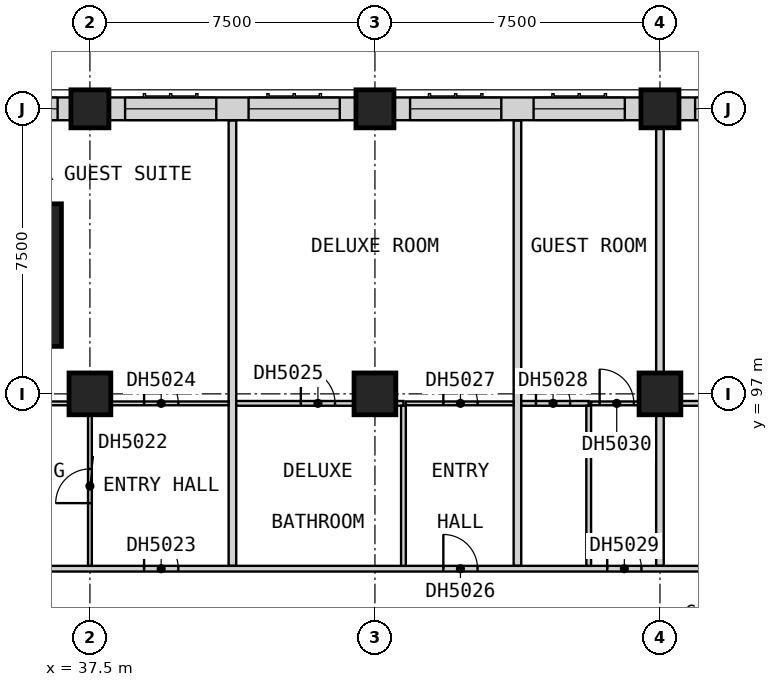
"""IFC4 building model, lengths in metres.
Left out: names, types, materials, properties, quantities, classifications, styles, units other than length and angle.
Written with IfcOpenShell. Run it as: python <this file> out.ifc"""

import sys

from ifc_helpers import new_model, si_unit, direction, frame, frame_2d, origin, origin_2d, place, context, subcontext, project, spatial, rectangle, extrude, element, fill, save


model = new_model("IFC4")
c1 = context("Model", 3, precision=1e-05, world=origin(), true_north=direction((0.0, 1.0)))
c2 = subcontext(c1, "Body", "Model", "MODEL_VIEW")
j1 = project(units=[si_unit("LENGTHUNIT", "METRE"), si_unit("PLANEANGLEUNIT", "RADIAN")], contexts=[c1])
p1 = place(None, origin())
s1 = spatial("IfcSite", under=j1, at=p1, CompositionType="ELEMENT")
p2 = place(p1, origin())
s2 = spatial("IfcBuilding", under=s1, at=p2, CompositionType="ELEMENT")
p3 = place(p2, frame((0.0, 0.0, 93.5)))
s3 = spatial("IfcBuildingStorey", under=s2, at=p3, CompositionType="ELEMENT", Elevation=93.5)
p4 = place(p3, frame((37.5, 97.0, 0.0), z_axis=(0.0, 0.0, 1.0), x_axis=(1.0, 0.0, 0.0)))
e1 = element("IfcColumn", 1, at=p4, inside=s3, PredefinedType="COLUMN", context=c2, shape_type="SweptSolid", body=[
    extrude(rectangle(XDim=1.1, YDim=1.1, at=origin_2d()), origin(), (0.0, 0.0, 1.0), 3.6),
])
p5 = place(p3, frame((37.5, 104.5, 0.0), z_axis=(0.0, 0.0, 1.0), x_axis=(1.0, 0.0, 0.0)))
e2 = element("IfcColumn", 2, at=p5, inside=s3, PredefinedType="COLUMN", context=c2, shape_type="SweptSolid", body=[
    extrude(rectangle(XDim=1.0, YDim=1.0, at=origin_2d()), origin(), (0.0, 0.0, 1.0), 3.6),
])
p6 = place(p3, frame((45.0, 97.0, 0.0), z_axis=(0.0, 0.0, 1.0), x_axis=(1.0, 0.0, 0.0)))
e3 = element("IfcColumn", 3, at=p6, inside=s3, PredefinedType="COLUMN", context=c2, shape_type="SweptSolid", body=[
    extrude(rectangle(XDim=1.1, YDim=1.1, at=origin_2d()), origin(), (0.0, 0.0, 1.0), 3.6),
])
p7 = place(p3, frame((45.0, 104.5, 0.0), z_axis=(0.0, 0.0, 1.0), x_axis=(1.0, 0.0, 0.0)))
e4 = element("IfcColumn", 4, at=p7, inside=s3, PredefinedType="COLUMN", context=c2, shape_type="SweptSolid", body=[
    extrude(rectangle(XDim=1.0, YDim=1.0, at=origin_2d()), origin(), (0.0, 0.0, 1.0), 3.6),
])
p8 = place(p3, frame((52.5, 97.0, 0.0), z_axis=(0.0, 0.0, 1.0), x_axis=(1.0, 0.0, 0.0)))
e5 = element("IfcColumn", 5, at=p8, inside=s3, PredefinedType="COLUMN", context=c2, shape_type="SweptSolid", body=[
    extrude(rectangle(XDim=1.1, YDim=1.1, at=origin_2d()), origin(), (0.0, 0.0, 1.0), 3.6),
])
p9 = place(p3, frame((52.5, 104.5, 0.0), z_axis=(0.0, 0.0, 1.0), x_axis=(1.0, 0.0, 0.0)))
e6 = element("IfcColumn", 6, at=p9, inside=s3, PredefinedType="COLUMN", context=c2, shape_type="SweptSolid", body=[
    extrude(rectangle(XDim=1.0, YDim=1.0, at=origin_2d()), origin(), (0.0, 0.0, 1.0), 3.6),
])
p10 = place(p3, frame((34.875, 100.125, 0.0), z_axis=(0.0, 0.0, 1.0), x_axis=(1.0, 0.0, 0.0)))
e7 = element("IfcColumn", 7, at=p10, inside=s3, PredefinedType="COLUMN", context=c2, shape_type="SweptSolid", body=[
    extrude(rectangle(XDim=3.75, YDim=3.75, at=origin_2d()), origin(), (0.0, 0.0, 1.0), 3.6),
])
p11 = place(p3, frame((59.5, 104.5, 0.0), z_axis=(0.0, 0.0, 1.0), x_axis=(-1.0, 0.0, 0.0)))
e8 = element("IfcWall", 8, at=p11, inside=s3, PredefinedType="SOLIDWALL", context=c2, shape_type="SweptSolid", body=[
    extrude(rectangle(XDim=6.5, YDim=0.6, at=frame_2d((3.25, 0.0))), origin(), (0.0, 0.0, 1.0), 2.85),
])
p12 = place(p11, frame((3.675, 0.0, 0.8)))
e9 = element("IfcOpeningElement", 9, at=p12, cuts=e8, PredefinedType="OPENING", context=c2, shape_type="SweptSolid", body=[
    extrude(rectangle(XDim=2.4, YDim=1.8, at=frame_2d((1.2, 0.9))), frame((0.0, 0.31, 0.0), z_axis=(0.0, -1.0, 0.0), x_axis=(1.0, 0.0, 0.0)), (0.0, 0.0, 1.0), 0.62),
])
p13 = place(p11, frame((0.425, 0.0, 0.8)))
e10 = element("IfcOpeningElement", 10, at=p13, cuts=e8, PredefinedType="OPENING", context=c2, shape_type="SweptSolid", body=[
    extrude(rectangle(XDim=2.4, YDim=1.8, at=frame_2d((1.2, 0.9))), frame((0.0, 0.31, 0.0), z_axis=(0.0, -1.0, 0.0), x_axis=(1.0, 0.0, 0.0)), (0.0, 0.0, 1.0), 0.62),
])
p14 = place(p3, frame((52.0, 104.5, 0.0), z_axis=(0.0, 0.0, 1.0), x_axis=(-1.0, 0.0, 0.0)))
e11 = element("IfcWall", 11, at=p14, inside=s3, PredefinedType="SOLIDWALL", context=c2, shape_type="SweptSolid", body=[
    extrude(rectangle(XDim=6.5, YDim=0.6, at=frame_2d((3.25, 0.0))), origin(), (0.0, 0.0, 1.0), 2.85),
])
p15 = place(p14, frame((3.675, 0.0, 0.8)))
e12 = element("IfcOpeningElement", 12, at=p15, cuts=e11, PredefinedType="OPENING", context=c2, shape_type="SweptSolid", body=[
    extrude(rectangle(XDim=2.4, YDim=1.8, at=frame_2d((1.2, 0.9))), frame((0.0, 0.31, 0.0), z_axis=(0.0, -1.0, 0.0), x_axis=(1.0, 0.0, 0.0)), (0.0, 0.0, 1.0), 0.62),
])
p16 = place(p14, frame((0.425, 0.0, 0.8)))
e13 = element("IfcOpeningElement", 13, at=p16, cuts=e11, PredefinedType="OPENING", context=c2, shape_type="SweptSolid", body=[
    extrude(rectangle(XDim=2.4, YDim=1.8, at=frame_2d((1.2, 0.9))), frame((0.0, 0.31, 0.0), z_axis=(0.0, -1.0, 0.0), x_axis=(1.0, 0.0, 0.0)), (0.0, 0.0, 1.0), 0.62),
])
p17 = place(p3, frame((44.5, 104.5, 0.0), z_axis=(0.0, 0.0, 1.0), x_axis=(-1.0, 0.0, 0.0)))
e14 = element("IfcWall", 14, at=p17, inside=s3, PredefinedType="SOLIDWALL", context=c2, shape_type="SweptSolid", body=[
    extrude(rectangle(XDim=6.5, YDim=0.6, at=frame_2d((3.25, 0.0))), origin(), (0.0, 0.0, 1.0), 2.85),
])
p18 = place(p17, frame((3.675, 0.0, 0.8)))
e15 = element("IfcOpeningElement", 15, at=p18, cuts=e14, PredefinedType="OPENING", context=c2, shape_type="SweptSolid", body=[
    extrude(rectangle(XDim=2.4, YDim=1.8, at=frame_2d((1.2, 0.9))), frame((0.0, 0.31, 0.0), z_axis=(0.0, -1.0, 0.0), x_axis=(1.0, 0.0, 0.0)), (0.0, 0.0, 1.0), 0.62),
])
p19 = place(p17, frame((0.425, 0.0, 0.8)))
e16 = element("IfcOpeningElement", 16, at=p19, cuts=e14, PredefinedType="OPENING", context=c2, shape_type="SweptSolid", body=[
    extrude(rectangle(XDim=2.4, YDim=1.8, at=frame_2d((1.2, 0.9))), frame((0.0, 0.31, 0.0), z_axis=(0.0, -1.0, 0.0), x_axis=(1.0, 0.0, 0.0)), (0.0, 0.0, 1.0), 0.62),
])
p20 = place(p3, frame((37.0, 104.5, 0.0), z_axis=(0.0, 0.0, 1.0), x_axis=(-1.0, 0.0, 0.0)))
e17 = element("IfcWall", 17, at=p20, inside=s3, PredefinedType="SOLIDWALL", context=c2, shape_type="SweptSolid", body=[
    extrude(rectangle(XDim=4.0, YDim=0.6, at=frame_2d((2.0, 0.0))), origin(), (0.0, 0.0, 1.0), 3.35),
])
p21 = place(p20, frame((0.35, 0.0, 0.8)))
e18 = element("IfcOpeningElement", 18, at=p21, cuts=e17, PredefinedType="OPENING", context=c2, shape_type="SweptSolid", body=[
    extrude(rectangle(XDim=2.4, YDim=1.8, at=frame_2d((1.2, 0.9))), frame((0.0, 0.31, 0.0), z_axis=(0.0, -1.0, 0.0), x_axis=(1.0, 0.0, 0.0)), (0.0, 0.0, 1.0), 0.62),
])
for number, where, z_axis, x_axis in (
    (19, (41.25, 92.475, 0.0), (0.0, 0.0, 1.0), (0.0, 1.0, 0.0)),
    (20, (48.75, 92.475, 0.0), (0.0, 0.0, 1.0), (0.0, 1.0, 0.0)),
):
    element("IfcWall", number, at=place(p3, frame(where, z_axis=z_axis, x_axis=x_axis)), inside=s3, PredefinedType="PARTITIONING", context=c2, shape_type="SweptSolid", body=[
        extrude(rectangle(XDim=11.715, YDim=0.2, at=frame_2d((5.857, 0.0))), origin(), (0.0, 0.0, 1.0), 3.35),
    ])
p22 = place(p3, frame((52.5, 92.475, 0.0), z_axis=(0.0, 0.0, 1.0), x_axis=(0.0, 1.0, 0.0)))
e21 = element("IfcWall", 21, at=p22, inside=s3, PredefinedType="PARTITIONING", context=c2, shape_type="SweptSolid", body=[
    extrude(rectangle(XDim=12.525, YDim=0.2, at=frame_2d((6.262, 0.0))), origin(), (0.0, 0.0, 1.0), 3.35),
])
p23 = place(p3, frame((33.75, 92.4, 0.0), z_axis=(0.0, 0.0, 1.0), x_axis=(1.0, 0.0, 0.0)))
e22 = element("IfcWall", 22, at=p23, inside=s3, PredefinedType="PARTITIONING", context=c2, shape_type="SweptSolid", body=[
    extrude(rectangle(XDim=43.65, YDim=0.15, at=frame_2d((21.825, 0.0))), origin(), (0.0, 0.0, 1.0), 3.35),
])
p24 = place(p23, frame((5.175, 0.0, 0.0)))
e23 = element("IfcOpeningElement", 23, at=p24, cuts=e22, PredefinedType="OPENING", context=c2, shape_type="SweptSolid", body=[
    extrude(rectangle(XDim=0.9, YDim=2.1, at=frame_2d((0.45, 1.05))), frame((0.0, 0.085, 0.0), z_axis=(0.0, -1.0, 0.0), x_axis=(1.0, 0.0, 0.0)), (0.0, 0.0, 1.0), 0.17),
])
p25 = place(p23, frame((13.05, 0.0, 0.0)))
e24 = element("IfcOpeningElement", 24, at=p25, cuts=e22, PredefinedType="OPENING", context=c2, shape_type="SweptSolid", body=[
    extrude(rectangle(XDim=0.9, YDim=2.1, at=frame_2d((0.45, 1.05))), frame((0.0, 0.085, 0.0), z_axis=(0.0, -1.0, 0.0), x_axis=(1.0, 0.0, 0.0)), (0.0, 0.0, 1.0), 0.17),
])
p26 = place(p23, frame((17.363, 0.0, 0.0)))
e25 = element("IfcOpeningElement", 25, at=p26, cuts=e22, PredefinedType="OPENING", context=c2, shape_type="SweptSolid", body=[
    extrude(rectangle(XDim=0.9, YDim=2.1, at=frame_2d((0.45, 1.05))), frame((0.0, 0.085, 0.0), z_axis=(0.0, -1.0, 0.0), x_axis=(1.0, 0.0, 0.0)), (0.0, 0.0, 1.0), 0.17),
])
p27 = place(p23, frame((24.3, 0.0, 0.0)))
e26 = element("IfcOpeningElement", 26, at=p27, cuts=e22, PredefinedType="OPENING", context=c2, shape_type="SweptSolid", body=[
    extrude(rectangle(XDim=0.9, YDim=2.1, at=frame_2d((0.45, 1.05))), frame((0.0, 0.085, 0.0), z_axis=(0.0, -1.0, 0.0), x_axis=(1.0, 0.0, 0.0)), (0.0, 0.0, 1.0), 0.17),
])
p28 = place(p23, frame((28.613, 0.0, 0.0)))
e27 = element("IfcOpeningElement", 27, at=p28, cuts=e22, PredefinedType="OPENING", context=c2, shape_type="SweptSolid", body=[
    extrude(rectangle(XDim=0.9, YDim=2.1, at=frame_2d((0.45, 1.05))), frame((0.0, 0.085, 0.0), z_axis=(0.0, -1.0, 0.0), x_axis=(1.0, 0.0, 0.0)), (0.0, 0.0, 1.0), 0.17),
])
p29 = place(p23, frame((32.363, 0.0, 0.0)))
e28 = element("IfcOpeningElement", 28, at=p29, cuts=e22, PredefinedType="OPENING", context=c2, shape_type="SweptSolid", body=[
    extrude(rectangle(XDim=0.9, YDim=2.1, at=frame_2d((0.45, 1.05))), frame((0.0, 0.085, 0.0), z_axis=(0.0, -1.0, 0.0), x_axis=(1.0, 0.0, 0.0)), (0.0, 0.0, 1.0), 0.17),
])
p30 = place(p23, frame((39.438, 0.0, 0.0)))
e29 = element("IfcOpeningElement", 29, at=p30, cuts=e22, PredefinedType="OPENING", context=c2, shape_type="SweptSolid", body=[
    extrude(rectangle(XDim=1.0, YDim=2.1, at=frame_2d((0.5, 1.05))), frame((0.0, 0.085, 0.0), z_axis=(0.0, -1.0, 0.0), x_axis=(1.0, 0.0, 0.0)), (0.0, 0.0, 1.0), 0.17),
])
p31 = place(p23, frame((42.0, 0.0, 0.0)))
e30 = element("IfcOpeningElement", 30, at=p31, cuts=e22, PredefinedType="OPENING", context=c2, shape_type="SweptSolid", body=[
    extrude(rectangle(XDim=0.9, YDim=2.1, at=frame_2d((0.45, 1.05))), frame((0.0, 0.085, 0.0), z_axis=(0.0, -1.0, 0.0), x_axis=(1.0, 0.0, 0.0)), (0.0, 0.0, 1.0), 0.17),
])
p32 = place(p3, frame((33.812, 96.75, 0.0), z_axis=(0.0, 0.0, 1.0), x_axis=(1.0, 0.0, 0.0)))
e31 = element("IfcWall", 31, at=p32, inside=s3, PredefinedType="PARTITIONING", context=c2, shape_type="SweptSolid", body=[
    extrude(rectangle(XDim=7.337, YDim=0.1, at=frame_2d((3.669, 0.0))), origin(), (0.0, 0.0, 1.0), 3.35),
])
p33 = place(p32, frame((5.113, 0.0, 0.0)))
e32 = element("IfcOpeningElement", 32, at=p33, cuts=e31, PredefinedType="OPENING", context=c2, shape_type="SweptSolid", body=[
    extrude(rectangle(XDim=0.9, YDim=2.1, at=frame_2d((0.45, 1.05))), frame((0.0, 0.06, 0.0), z_axis=(0.0, -1.0, 0.0), x_axis=(1.0, 0.0, 0.0)), (0.0, 0.0, 1.0), 0.12),
])
p34 = place(p3, frame((45.812, 96.75, 0.0), z_axis=(0.0, 0.0, 1.0), x_axis=(1.0, 0.0, 0.0)))
e33 = element("IfcWall", 33, at=p34, inside=s3, PredefinedType="PARTITIONING", context=c2, shape_type="SweptSolid", body=[
    extrude(rectangle(XDim=2.837, YDim=0.1, at=frame_2d((1.419, 0.0))), origin(), (0.0, 0.0, 1.0), 3.35),
])
p35 = place(p34, frame((0.988, 0.0, 0.0)))
e34 = element("IfcOpeningElement", 34, at=p35, cuts=e33, PredefinedType="OPENING", context=c2, shape_type="SweptSolid", body=[
    extrude(rectangle(XDim=0.9, YDim=2.1, at=frame_2d((0.45, 1.05))), frame((0.0, 0.06, 0.0), z_axis=(0.0, -1.0, 0.0), x_axis=(1.0, 0.0, 0.0)), (0.0, 0.0, 1.0), 0.12),
])
p36 = place(p3, frame((50.688, 96.75, 0.0), z_axis=(0.0, 0.0, 1.0), x_axis=(1.0, 0.0, 0.0)))
e35 = element("IfcWall", 35, at=p36, inside=s3, PredefinedType="PARTITIONING", context=c2, shape_type="SweptSolid", body=[
    extrude(rectangle(XDim=1.712, YDim=0.1, at=frame_2d((0.856, 0.0))), origin(), (0.0, 0.0, 1.0), 3.35),
])
p37 = place(p36, frame((0.225, 0.0, 0.0)))
e36 = element("IfcOpeningElement", 36, at=p37, cuts=e35, PredefinedType="OPENING", context=c2, shape_type="SweptSolid", body=[
    extrude(rectangle(XDim=0.9, YDim=2.1, at=frame_2d((0.45, 1.05))), frame((0.0, 0.06, 0.0), z_axis=(0.0, -1.0, 0.0), x_axis=(1.0, 0.0, 0.0)), (0.0, 0.0, 1.0), 0.12),
])
p38 = place(p3, frame((37.5, 92.475, 0.0), z_axis=(0.0, 0.0, 1.0), x_axis=(0.0, 1.0, 0.0)))
e37 = element("IfcWall", 37, at=p38, inside=s3, PredefinedType="PARTITIONING", context=c2, shape_type="SweptSolid", body=[
    extrude(rectangle(XDim=4.225, YDim=0.1, at=frame_2d((2.112, 0.0))), origin(), (0.0, 0.0, 1.0), 3.35),
])
p39 = place(p38, frame((1.65, 0.0, 0.0)))
e38 = element("IfcOpeningElement", 38, at=p39, cuts=e37, PredefinedType="OPENING", context=c2, shape_type="SweptSolid", body=[
    extrude(rectangle(XDim=0.9, YDim=2.1, at=frame_2d((0.45, 1.05))), frame((0.0, 0.06, 0.0), z_axis=(0.0, -1.0, 0.0), x_axis=(1.0, 0.0, 0.0)), (0.0, 0.0, 1.0), 0.12),
])
p40 = place(p3, frame((41.35, 96.75, 0.0), z_axis=(0.0, 0.0, 1.0), x_axis=(1.0, 0.0, 0.0)))
e39 = element("IfcWall", 39, at=p40, inside=s3, PredefinedType="PARTITIONING", context=c2, shape_type="SweptSolid", body=[
    extrude(rectangle(XDim=4.4, YDim=0.125, at=frame_2d((2.2, 0.0))), origin(), (0.0, 0.0, 1.0), 3.35),
])
p41 = place(p40, frame((1.7, 0.0, 0.0)))
e40 = element("IfcOpeningElement", 40, at=p41, cuts=e39, PredefinedType="OPENING", context=c2, shape_type="SweptSolid", body=[
    extrude(rectangle(XDim=0.9, YDim=2.1, at=frame_2d((0.45, 1.05))), frame((0.0, 0.073, 0.0), z_axis=(0.0, -1.0, 0.0), x_axis=(1.0, 0.0, 0.0)), (0.0, 0.0, 1.0), 0.145),
])
p42 = place(p3, frame((48.85, 96.75, 0.0), z_axis=(0.0, 0.0, 1.0), x_axis=(1.0, 0.0, 0.0)))
e41 = element("IfcWall", 41, at=p42, inside=s3, PredefinedType="PARTITIONING", context=c2, shape_type="SweptSolid", body=[
    extrude(rectangle(XDim=1.775, YDim=0.125, at=frame_2d((0.887, 0.0))), origin(), (0.0, 0.0, 1.0), 3.35),
])
p43 = place(p42, frame((0.387, 0.0, 0.0)))
e42 = element("IfcOpeningElement", 42, at=p43, cuts=e41, PredefinedType="OPENING", context=c2, shape_type="SweptSolid", body=[
    extrude(rectangle(XDim=0.9, YDim=2.1, at=frame_2d((0.45, 1.05))), frame((0.0, 0.073, 0.0), z_axis=(0.0, -1.0, 0.0), x_axis=(1.0, 0.0, 0.0)), (0.0, 0.0, 1.0), 0.145),
])
p44 = place(p3, frame((52.6, 96.75, 0.0), z_axis=(0.0, 0.0, 1.0), x_axis=(1.0, 0.0, 0.0)))
e43 = element("IfcWall", 43, at=p44, inside=s3, PredefinedType="PARTITIONING", context=c2, shape_type="SweptSolid", body=[
    extrude(rectangle(XDim=4.4, YDim=0.125, at=frame_2d((2.2, 0.0))), origin(), (0.0, 0.0, 1.0), 3.35),
])
p45 = place(p44, frame((1.7, 0.0, 0.0)))
e44 = element("IfcOpeningElement", 44, at=p45, cuts=e43, PredefinedType="OPENING", context=c2, shape_type="SweptSolid", body=[
    extrude(rectangle(XDim=0.9, YDim=2.1, at=frame_2d((0.45, 1.05))), frame((0.0, 0.073, 0.0), z_axis=(0.0, -1.0, 0.0), x_axis=(1.0, 0.0, 0.0)), (0.0, 0.0, 1.0), 0.145),
])
for number, where, z_axis, x_axis in (
    (45, (45.75, 92.475, 0.0), (0.0, 0.0, 1.0), (0.0, 1.0, 0.0)),
    (46, (50.625, 92.475, 0.0), (0.0, 0.0, 1.0), (0.0, 1.0, 0.0)),
):
    element("IfcWall", number, at=place(p3, frame(where, z_axis=z_axis, x_axis=x_axis)), inside=s3, PredefinedType="PARTITIONING", context=c2, shape_type="SweptSolid", body=[
        extrude(rectangle(XDim=4.212, YDim=0.125, at=frame_2d((2.106, 0.0))), origin(), (0.0, 0.0, 1.0), 3.35),
    ])
p46 = place(p12, origin())
e47 = element("IfcWindow", 47, at=p46, inside=s3, PartitioningType="SINGLE_PANEL", PredefinedType="WINDOW", context=c2, shape_type="SweptSolid", body=[
    extrude(rectangle(XDim=2.4, YDim=1.8, at=frame_2d((1.2, 0.9))), frame((0.0, -0.07, 0.0), z_axis=(0.0, -1.0, 0.0), x_axis=(1.0, 0.0, 0.0)), (0.0, 0.0, 1.0), 0.06),
])
fill(e9, e47)
p47 = place(p15, origin())
e48 = element("IfcWindow", 48, at=p47, inside=s3, PartitioningType="SINGLE_PANEL", PredefinedType="WINDOW", context=c2, shape_type="SweptSolid", body=[
    extrude(rectangle(XDim=2.4, YDim=1.8, at=frame_2d((1.2, 0.9))), frame((0.0, -0.07, 0.0), z_axis=(0.0, -1.0, 0.0), x_axis=(1.0, 0.0, 0.0)), (0.0, 0.0, 1.0), 0.06),
])
fill(e12, e48)
p48 = place(p16, origin())
e49 = element("IfcWindow", 49, at=p48, inside=s3, PartitioningType="SINGLE_PANEL", PredefinedType="WINDOW", context=c2, shape_type="SweptSolid", body=[
    extrude(rectangle(XDim=2.4, YDim=1.8, at=frame_2d((1.2, 0.9))), frame((0.0, -0.07, 0.0), z_axis=(0.0, -1.0, 0.0), x_axis=(1.0, 0.0, 0.0)), (0.0, 0.0, 1.0), 0.06),
])
fill(e13, e49)
p49 = place(p18, origin())
e50 = element("IfcWindow", 50, at=p49, inside=s3, PartitioningType="SINGLE_PANEL", PredefinedType="WINDOW", context=c2, shape_type="SweptSolid", body=[
    extrude(rectangle(XDim=2.4, YDim=1.8, at=frame_2d((1.2, 0.9))), frame((0.0, -0.07, 0.0), z_axis=(0.0, -1.0, 0.0), x_axis=(1.0, 0.0, 0.0)), (0.0, 0.0, 1.0), 0.06),
])
fill(e15, e50)
p50 = place(p19, origin())
e51 = element("IfcWindow", 51, at=p50, inside=s3, PartitioningType="SINGLE_PANEL", PredefinedType="WINDOW", context=c2, shape_type="SweptSolid", body=[
    extrude(rectangle(XDim=2.4, YDim=1.8, at=frame_2d((1.2, 0.9))), frame((0.0, -0.07, 0.0), z_axis=(0.0, -1.0, 0.0), x_axis=(1.0, 0.0, 0.0)), (0.0, 0.0, 1.0), 0.06),
])
fill(e16, e51)
p51 = place(p21, origin())
e52 = element("IfcWindow", 52, at=p51, inside=s3, PartitioningType="SINGLE_PANEL", PredefinedType="WINDOW", context=c2, shape_type="SweptSolid", body=[
    extrude(rectangle(XDim=2.4, YDim=1.8, at=frame_2d((1.2, 0.9))), frame((0.0, -0.07, 0.0), z_axis=(0.0, -1.0, 0.0), x_axis=(1.0, 0.0, 0.0)), (0.0, 0.0, 1.0), 0.06),
])
fill(e18, e52)
p52 = place(p39, origin())
e53 = element("IfcDoor", 53, at=p52, inside=s3, OperationType="SINGLE_SWING_RIGHT", PredefinedType="DOOR", context=c2, shape_type="SweptSolid", body=[
    extrude(rectangle(XDim=0.9, YDim=2.1, at=frame_2d((0.45, 1.05))), frame((0.0, 0.025, 0.0), z_axis=(0.0, -1.0, 0.0), x_axis=(1.0, 0.0, 0.0)), (0.0, 0.0, 1.0), 0.05),
])
fill(e38, e53)
p53 = place(p24, origin())
e54 = element("IfcDoor", 54, at=p53, inside=s3, OperationType="SINGLE_SWING_LEFT", PredefinedType="DOOR", context=c2, shape_type="SweptSolid", body=[
    extrude(rectangle(XDim=0.9, YDim=2.1, at=frame_2d((0.45, 1.05))), frame((0.0, 0.025, 0.0), z_axis=(0.0, -1.0, 0.0), x_axis=(1.0, 0.0, 0.0)), (0.0, 0.0, 1.0), 0.05),
])
fill(e23, e54)
p54 = place(p33, origin())
e55 = element("IfcDoor", 55, at=p54, inside=s3, OperationType="SINGLE_SWING_RIGHT", PredefinedType="DOOR", context=c2, shape_type="SweptSolid", body=[
    extrude(rectangle(XDim=0.9, YDim=2.1, at=frame_2d((0.45, 1.05))), frame((0.0, 0.025, 0.0), z_axis=(0.0, -1.0, 0.0), x_axis=(1.0, 0.0, 0.0)), (0.0, 0.0, 1.0), 0.05),
])
fill(e32, e55)
p55 = place(p41, origin())
e56 = element("IfcDoor", 56, at=p55, inside=s3, OperationType="SINGLE_SWING_RIGHT", PredefinedType="DOOR", context=c2, shape_type="SweptSolid", body=[
    extrude(rectangle(XDim=0.9, YDim=2.1, at=frame_2d((0.45, 1.05))), frame((0.0, 0.025, 0.0), z_axis=(0.0, -1.0, 0.0), x_axis=(1.0, 0.0, 0.0)), (0.0, 0.0, 1.0), 0.05),
])
fill(e40, e56)
p56 = place(p25, origin())
e57 = element("IfcDoor", 57, at=p56, inside=s3, OperationType="SINGLE_SWING_LEFT", PredefinedType="DOOR", context=c2, shape_type="SweptSolid", body=[
    extrude(rectangle(XDim=0.9, YDim=2.1, at=frame_2d((0.45, 1.05))), frame((0.0, 0.025, 0.0), z_axis=(0.0, -1.0, 0.0), x_axis=(1.0, 0.0, 0.0)), (0.0, 0.0, 1.0), 0.05),
])
fill(e24, e57)
p57 = place(p35, origin())
e58 = element("IfcDoor", 58, at=p57, inside=s3, OperationType="SINGLE_SWING_RIGHT", PredefinedType="DOOR", context=c2, shape_type="SweptSolid", body=[
    extrude(rectangle(XDim=0.9, YDim=2.1, at=frame_2d((0.45, 1.05))), frame((0.0, 0.025, 0.0), z_axis=(0.0, -1.0, 0.0), x_axis=(1.0, 0.0, 0.0)), (0.0, 0.0, 1.0), 0.05),
])
fill(e34, e58)
p58 = place(p43, origin())
e59 = element("IfcDoor", 59, at=p58, inside=s3, OperationType="SINGLE_SWING_RIGHT", PredefinedType="DOOR", context=c2, shape_type="SweptSolid", body=[
    extrude(rectangle(XDim=0.9, YDim=2.1, at=frame_2d((0.45, 1.05))), frame((0.0, 0.025, 0.0), z_axis=(0.0, -1.0, 0.0), x_axis=(1.0, 0.0, 0.0)), (0.0, 0.0, 1.0), 0.05),
])
fill(e42, e59)
p59 = place(p26, origin())
e60 = element("IfcDoor", 60, at=p59, inside=s3, OperationType="SINGLE_SWING_LEFT", PredefinedType="DOOR", context=c2, shape_type="SweptSolid", body=[
    extrude(rectangle(XDim=0.9, YDim=2.1, at=frame_2d((0.45, 1.05))), frame((0.0, 0.025, 0.0), z_axis=(0.0, -1.0, 0.0), x_axis=(1.0, 0.0, 0.0)), (0.0, 0.0, 1.0), 0.05),
])
fill(e25, e60)
p60 = place(p37, origin())
e61 = element("IfcDoor", 61, at=p60, inside=s3, OperationType="SINGLE_SWING_RIGHT", PredefinedType="DOOR", context=c2, shape_type="SweptSolid", body=[
    extrude(rectangle(XDim=0.9, YDim=2.1, at=frame_2d((0.45, 1.05))), frame((0.0, 0.025, 0.0), z_axis=(0.0, -1.0, 0.0), x_axis=(1.0, 0.0, 0.0)), (0.0, 0.0, 1.0), 0.05),
])
fill(e36, e61)
save(model, sys.argv[1])
